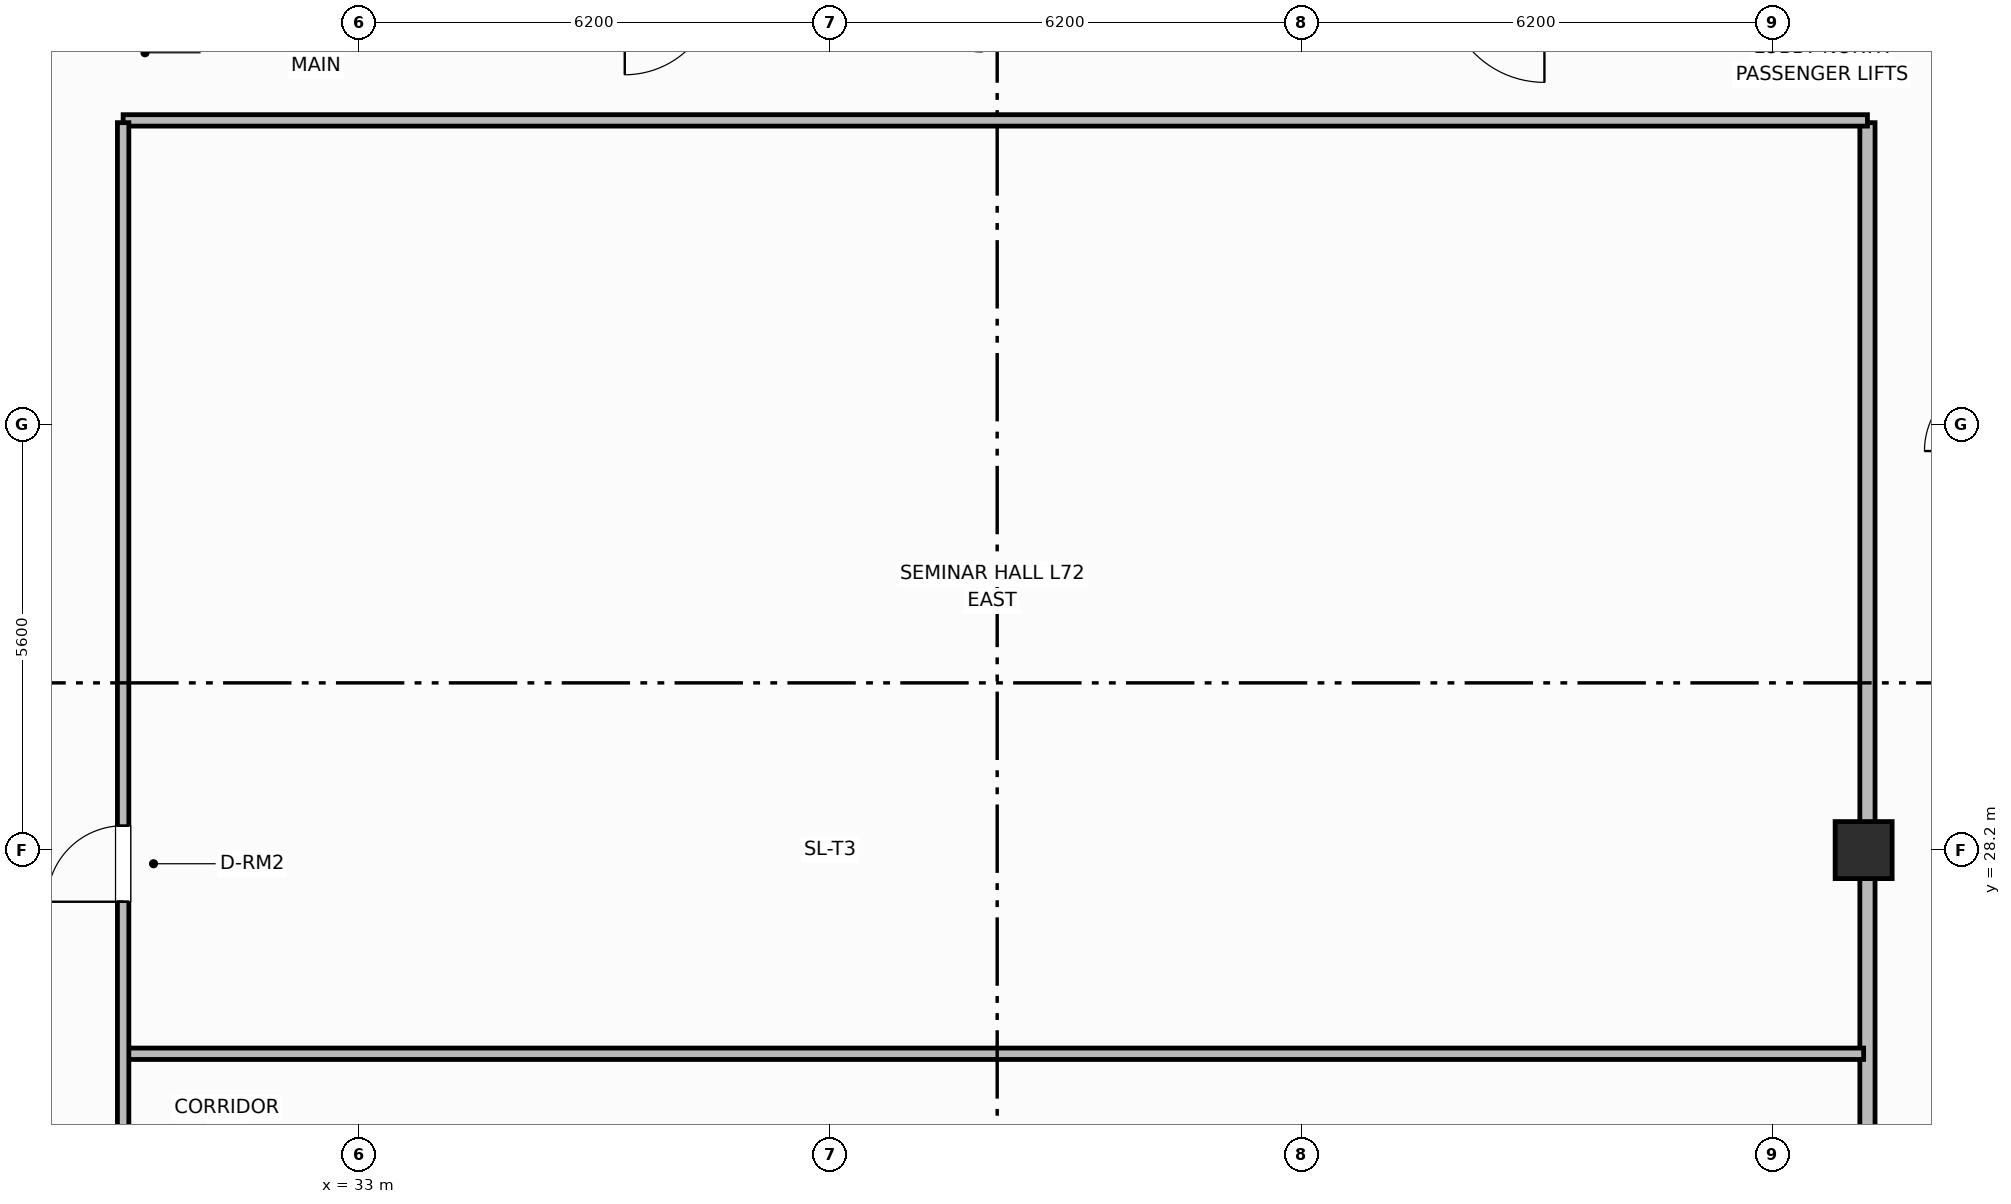
"""IFC4 building model, lengths in metres.
Left out: names, types, materials, properties, quantities, classifications, styles, units other than length and angle.
Written with IfcOpenShell. Run it as: python <this file> out.ifc"""

import sys

from ifc_helpers import new_model, si_unit, direction, frame, frame_2d, origin, origin_2d, place, context, subcontext, project, spatial, rectangle, extrude, element, fill, save


model = new_model("IFC4")
c1 = context("Model", 3, precision=1e-05, world=origin(), true_north=direction((0.0, 1.0)))
c2 = subcontext(c1, "Body", "Model", "MODEL_VIEW")
j1 = project(units=[si_unit("LENGTHUNIT", "METRE"), si_unit("PLANEANGLEUNIT", "RADIAN")], contexts=[c1])
p1 = place(None, origin())
s1 = spatial("IfcSite", under=j1, at=p1, CompositionType="ELEMENT")
p2 = place(p1, origin())
s2 = spatial("IfcBuilding", under=s1, at=p2, CompositionType="ELEMENT")
p3 = place(p2, frame((0.0, 0.0, 286.1)))
s3 = spatial("IfcBuildingStorey", under=s2, at=p3, CompositionType="ELEMENT", Elevation=286.1)
p4 = place(p3, frame((52.8, 28.2, 0.0), z_axis=(0.0, 0.0, 1.0), x_axis=(1.0, 0.0, 0.0)))
e1 = element("IfcColumn", 1, at=p4, inside=s3, PredefinedType="COLUMN", context=c2, shape_type="SweptSolid", body=[
    extrude(rectangle(XDim=0.75, YDim=0.75, at=origin_2d()), origin(), (0.0, 0.0, 1.0), 3.7),
])
p5 = place(p3, frame((52.85, 18.63, 0.0), z_axis=(0.0, 0.0, 1.0), x_axis=(0.0, 1.0, 0.0)))
e2 = element("IfcWall", 2, at=p5, inside=s3, PredefinedType="PARTITIONING", context=c2, shape_type="SweptSolid", body=[
    extrude(rectangle(XDim=19.14, YDim=0.2, at=frame_2d((9.57, 0.0))), origin(), (0.0, 0.0, 1.0), 2.56),
])
p6 = place(p3, frame((29.9, 37.8, 0.0), z_axis=(0.0, 0.0, 1.0), x_axis=(1.0, 0.0, 0.0)))
e3 = element("IfcWall", 3, at=p6, inside=s3, PredefinedType="PARTITIONING", context=c2, shape_type="SweptSolid", body=[
    extrude(rectangle(XDim=22.95, YDim=0.15, at=frame_2d((11.475, 0.0))), origin(), (0.0, 0.0, 1.0), 2.56),
])
p7 = place(p3, frame((29.93, 25.521, 0.0), z_axis=(0.0, 0.0, 1.0), x_axis=(1.0, 0.0, 0.0)))
e4 = element("IfcWall", 4, at=p7, inside=s3, PredefinedType="PARTITIONING", context=c2, shape_type="SweptSolid", body=[
    extrude(rectangle(XDim=22.87, YDim=0.15, at=frame_2d((11.435, 0.0))), origin(), (0.0, 0.0, 1.0), 2.56),
])
p8 = place(p3, frame((29.9, 18.63, 0.0), z_axis=(0.0, 0.0, 1.0), x_axis=(0.0, 1.0, 0.0)))
e5 = element("IfcWall", 5, at=p8, inside=s3, PredefinedType="PARTITIONING", context=c2, shape_type="SweptSolid", body=[
    extrude(rectangle(XDim=19.14, YDim=0.15, at=frame_2d((9.57, 0.0))), origin(), (0.0, 0.0, 1.0), 2.56),
])
p9 = place(p8, frame((2.4, 0.0, 0.0)))
e6 = element("IfcOpeningElement", 6, at=p9, cuts=e5, PredefinedType="OPENING", context=c2, shape_type="SweptSolid", body=[
    extrude(rectangle(XDim=1.0, YDim=2.15, at=frame_2d((0.5, 1.075))), frame((0.0, 0.085, 0.0), z_axis=(0.0, -1.0, 0.0), x_axis=(1.0, 0.0, 0.0)), (0.0, 0.0, 1.0), 0.17),
])
p10 = place(p8, frame((8.89, 0.0, 0.0)))
e7 = element("IfcOpeningElement", 7, at=p10, cuts=e5, PredefinedType="OPENING", context=c2, shape_type="SweptSolid", body=[
    extrude(rectangle(XDim=1.0, YDim=2.15, at=frame_2d((0.5, 1.075))), frame((0.0, 0.085, 0.0), z_axis=(0.0, -1.0, 0.0), x_axis=(1.0, 0.0, 0.0)), (0.0, 0.0, 1.0), 0.17),
])
p11 = place(p10, origin())
e8 = element("IfcDoor", 8, at=p11, inside=s3, OperationType="SINGLE_SWING_LEFT", PredefinedType="DOOR", context=c2, shape_type="SweptSolid", body=[
    extrude(rectangle(XDim=1.0, YDim=2.15, at=frame_2d((0.5, 1.075))), frame((0.0, 0.025, 0.0), z_axis=(0.0, -1.0, 0.0), x_axis=(1.0, 0.0, 0.0)), (0.0, 0.0, 1.0), 0.05),
])
fill(e7, e8)
save(model, sys.argv[1])
